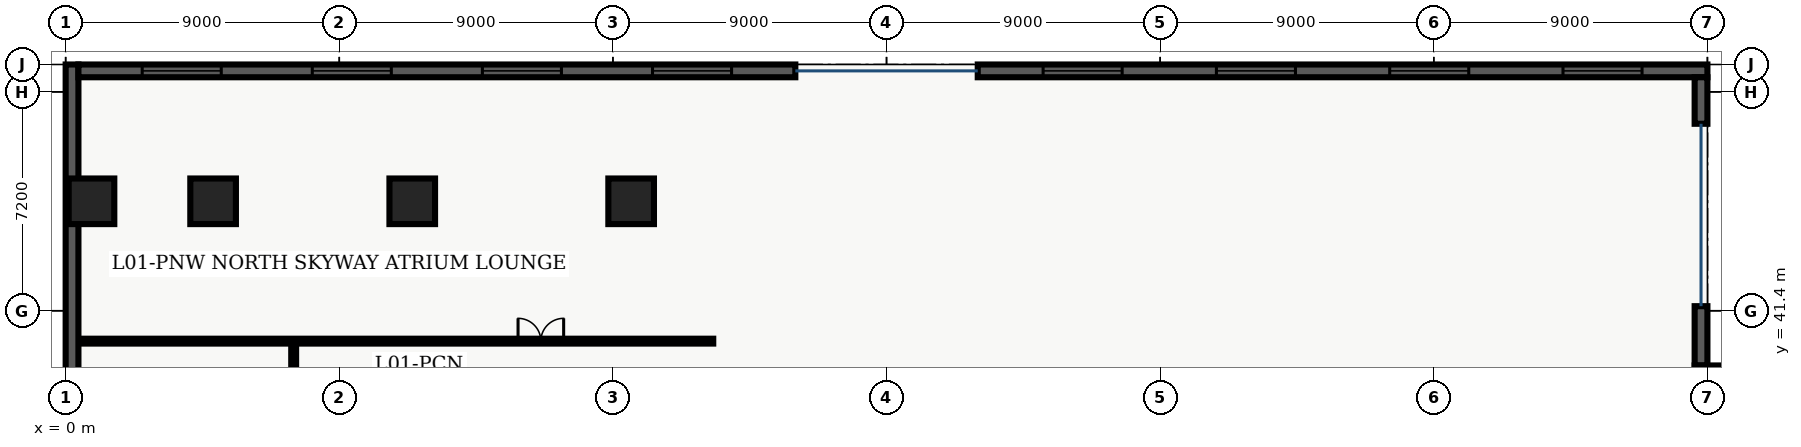
"""IFC4 building model, lengths in metres.
Left out: names, types, materials, properties, quantities, classifications, styles, units other than length and angle.
Written with IfcOpenShell. Run it as: python <this file> out.ifc"""

import sys

from ifc_helpers import new_model, entity, si_unit, converted_unit, direction, frame, origin_with_axes, origin_2d_with_axis, place, context, subcontext, project, spatial, polyline, rectangle, outline, extrude, element, fill, save


model = new_model("IFC4")
c1 = context("Model", 3, precision=1e-05, world=origin_with_axes(), true_north=direction((0.0, 1.0)))
c2 = subcontext(c1, "Body", "Model", "MODEL_VIEW")
j1 = project(units=[si_unit("LENGTHUNIT", "METRE"), converted_unit("PLANEANGLEUNIT", "DEGREE", entity("IfcPlaneAngleMeasure", 0.017), si_unit("PLANEANGLEUNIT", "RADIAN"), dimensions=[0, 0, 0, 0, 0, 0, 0])], contexts=[c1])
p1 = place(None, origin_with_axes())
s1 = spatial("IfcSite", under=j1, at=p1, CompositionType="ELEMENT")
p2 = place(p1, origin_with_axes())
s2 = spatial("IfcBuilding", under=s1, at=p2, CompositionType="ELEMENT")
p3 = place(p2, frame((0.0, 0.0, 5.7), z_axis=(0.0, 0.0, 1.0), x_axis=(1.0, 0.0, 0.0)))
s3 = spatial("IfcBuildingStorey", under=s2, at=p3, CompositionType="ELEMENT", Elevation=5.7)
for number, where, z_axis, x_axis in (
    (1, (11.4, 45.0, 0.0), (0.0, 0.0, 1.0), (1.0, 0.0, 0.0)),
    (2, (18.6, 45.0, 0.0), (0.0, 0.0, 1.0), (1.0, 0.0, 0.0)),
    (3, (4.85, 45.0, 0.0), (0.0, 0.0, 1.0), (1.0, 0.0, 0.0)),
    (4, (0.85, 45.0, 0.0), (0.0, 0.0, 1.0), (1.0, 0.0, 0.0)),
):
    element("IfcColumn", number, at=place(p3, frame(where, z_axis=z_axis, x_axis=x_axis)), inside=s3, PredefinedType="COLUMN", context=c2, shape_type="SweptSolid", body=[
        extrude(rectangle(XDim=1.5, YDim=1.5, at=origin_2d_with_axis()), origin_with_axes(), (0.0, 0.0, 1.0), 5.1),
    ])
p4 = place(p3, frame((0.38, 40.4, 0.0), z_axis=(0.0, 0.0, 1.0), x_axis=(1.0, 0.0, 0.0)))
e5 = element("IfcWall", 5, at=p4, inside=s3, PredefinedType="PARTITIONING", context=c2, shape_type="SweptSolid", body=[
    extrude(outline(polyline([(0.0, -0.08), (20.92, -0.08), (20.92, 0.08), (0.0, 0.08), (0.0, -0.08)])), origin_with_axes(), (0.0, 0.0, 1.0), 3.2),
])
p5 = place(p4, frame((15.25, 0.0, 0.0), z_axis=(0.0, 0.0, 1.0), x_axis=(1.0, 0.0, 0.0)))
e6 = element("IfcOpeningElement", 6, at=p5, cuts=e5, PredefinedType="OPENING", context=c2, shape_type="SweptSolid", body=[
    extrude(rectangle(XDim=1.5, YDim=0.18, at=origin_2d_with_axis()), origin_with_axes(), (0.0, 0.0, 1.0), 2.2),
])
p6 = place(p3, frame((7.5, 7.8, 0.0), z_axis=(0.0, 0.0, 1.0), x_axis=(0.0, 1.0, 0.0)))
e7 = element("IfcWall", 7, at=p6, inside=s3, PredefinedType="PARTITIONING", context=c2, shape_type="SweptSolid", body=[
    extrude(outline(polyline([(0.0, -0.08), (32.6, -0.08), (32.6, 0.08), (0.0, 0.08), (0.0, -0.08)])), origin_with_axes(), (0.0, 0.0, 1.0), 3.2),
])
p7 = place(p6, frame((8.25, 0.0, 0.0), z_axis=(0.0, 0.0, 1.0), x_axis=(1.0, 0.0, 0.0)))
e8 = element("IfcOpeningElement", 8, at=p7, cuts=e7, PredefinedType="OPENING", context=c2, shape_type="SweptSolid", body=[
    extrude(rectangle(XDim=1.5, YDim=0.18, at=origin_2d_with_axis()), origin_with_axes(), (0.0, 0.0, 1.0), 2.2),
])
p8 = place(p6, frame((21.5, 0.0, 0.0), z_axis=(0.0, 0.0, 1.0), x_axis=(1.0, 0.0, 0.0)))
e9 = element("IfcOpeningElement", 9, at=p8, cuts=e7, PredefinedType="OPENING", context=c2, shape_type="SweptSolid", body=[
    extrude(rectangle(XDim=1.0, YDim=0.18, at=origin_2d_with_axis()), origin_with_axes(), (0.0, 0.0, 1.0), 2.15),
])
p9 = place(p3, frame((0.21, 16.6, 0.0), z_axis=(0.0, 0.0, 1.0), x_axis=(0.0, 1.0, 0.0)))
e10 = element("IfcWall", 10, at=p9, inside=s3, PredefinedType="SOLIDWALL", context=c2, shape_type="SweptSolid", body=[
    extrude(outline(polyline([(0.0, -0.21), (32.9, -0.21), (32.9, 0.21), (0.0, 0.21), (0.0, -0.21)])), origin_with_axes(), (0.0, 0.0, 1.0), 4.86),
])
p10 = place(p9, frame((3.692, 0.0, 0.45), z_axis=(0.0, 0.0, 1.0), x_axis=(1.0, 0.0, 0.0)))
e11 = element("IfcOpeningElement", 11, at=p10, cuts=e10, PredefinedType="OPENING", context=c2, shape_type="SweptSolid", body=[
    extrude(rectangle(XDim=2.6, YDim=0.44, at=origin_2d_with_axis()), origin_with_axes(), (0.0, 0.0, 1.0), 2.8),
])
p11 = place(p9, frame((8.525, 0.0, 0.45), z_axis=(0.0, 0.0, 1.0), x_axis=(1.0, 0.0, 0.0)))
e12 = element("IfcOpeningElement", 12, at=p11, cuts=e10, PredefinedType="OPENING", context=c2, shape_type="SweptSolid", body=[
    extrude(rectangle(XDim=2.6, YDim=0.44, at=origin_2d_with_axis()), origin_with_axes(), (0.0, 0.0, 1.0), 2.8),
])
p12 = place(p9, frame((18.642, 0.0, 0.45), z_axis=(0.0, 0.0, 1.0), x_axis=(1.0, 0.0, 0.0)))
e13 = element("IfcOpeningElement", 13, at=p12, cuts=e10, PredefinedType="OPENING", context=c2, shape_type="SweptSolid", body=[
    extrude(rectangle(XDim=2.6, YDim=0.44, at=origin_2d_with_axis()), origin_with_axes(), (0.0, 0.0, 1.0), 2.8),
])
p13 = place(p3, frame((0.42, 49.29, 0.0), z_axis=(0.0, 0.0, 1.0), x_axis=(1.0, 0.0, 0.0)))
e14 = element("IfcWall", 14, at=p13, inside=s3, PredefinedType="SOLIDWALL", context=c2, shape_type="SweptSolid", body=[
    extrude(outline(polyline([(0.0, -0.21), (23.58, -0.21), (23.58, 0.21), (0.0, 0.21), (0.0, -0.21)])), origin_with_axes(), (0.0, 0.0, 1.0), 4.86),
])
p14 = place(p13, frame((3.398, 0.0, 0.45), z_axis=(0.0, 0.0, 1.0), x_axis=(1.0, 0.0, 0.0)))
e15 = element("IfcOpeningElement", 15, at=p14, cuts=e14, PredefinedType="OPENING", context=c2, shape_type="SweptSolid", body=[
    extrude(rectangle(XDim=2.6, YDim=0.44, at=origin_2d_with_axis()), origin_with_axes(), (0.0, 0.0, 1.0), 2.8),
])
p15 = place(p13, frame((8.992, 0.0, 0.45), z_axis=(0.0, 0.0, 1.0), x_axis=(1.0, 0.0, 0.0)))
e16 = element("IfcOpeningElement", 16, at=p15, cuts=e14, PredefinedType="OPENING", context=c2, shape_type="SweptSolid", body=[
    extrude(rectangle(XDim=2.6, YDim=0.44, at=origin_2d_with_axis()), origin_with_axes(), (0.0, 0.0, 1.0), 2.8),
])
p16 = place(p13, frame((14.587, 0.0, 0.45), z_axis=(0.0, 0.0, 1.0), x_axis=(1.0, 0.0, 0.0)))
e17 = element("IfcOpeningElement", 17, at=p16, cuts=e14, PredefinedType="OPENING", context=c2, shape_type="SweptSolid", body=[
    extrude(rectangle(XDim=2.6, YDim=0.44, at=origin_2d_with_axis()), origin_with_axes(), (0.0, 0.0, 1.0), 2.8),
])
p17 = place(p13, frame((20.183, 0.0, 0.45), z_axis=(0.0, 0.0, 1.0), x_axis=(1.0, 0.0, 0.0)))
e18 = element("IfcOpeningElement", 18, at=p17, cuts=e14, PredefinedType="OPENING", context=c2, shape_type="SweptSolid", body=[
    extrude(rectangle(XDim=2.6, YDim=0.44, at=origin_2d_with_axis()), origin_with_axes(), (0.0, 0.0, 1.0), 2.8),
])
p18 = place(p3, frame((30.0, 49.29, 0.0), z_axis=(0.0, 0.0, 1.0), x_axis=(1.0, 0.0, 0.0)))
e19 = element("IfcWall", 19, at=p18, inside=s3, PredefinedType="SOLIDWALL", context=c2, shape_type="SweptSolid", body=[
    extrude(outline(polyline([(0.0, -0.21), (24.0, -0.21), (24.0, 0.21), (0.0, 0.21), (0.0, -0.21)])), origin_with_axes(), (0.0, 0.0, 1.0), 4.86),
])
p19 = place(p18, frame((3.45, 0.0, 0.45), z_axis=(0.0, 0.0, 1.0), x_axis=(1.0, 0.0, 0.0)))
e20 = element("IfcOpeningElement", 20, at=p19, cuts=e19, PredefinedType="OPENING", context=c2, shape_type="SweptSolid", body=[
    extrude(rectangle(XDim=2.6, YDim=0.44, at=origin_2d_with_axis()), origin_with_axes(), (0.0, 0.0, 1.0), 2.8),
])
p20 = place(p18, frame((9.15, 0.0, 0.45), z_axis=(0.0, 0.0, 1.0), x_axis=(1.0, 0.0, 0.0)))
e21 = element("IfcOpeningElement", 21, at=p20, cuts=e19, PredefinedType="OPENING", context=c2, shape_type="SweptSolid", body=[
    extrude(rectangle(XDim=2.6, YDim=0.44, at=origin_2d_with_axis()), origin_with_axes(), (0.0, 0.0, 1.0), 2.8),
])
p21 = place(p18, frame((14.85, 0.0, 0.45), z_axis=(0.0, 0.0, 1.0), x_axis=(1.0, 0.0, 0.0)))
e22 = element("IfcOpeningElement", 22, at=p21, cuts=e19, PredefinedType="OPENING", context=c2, shape_type="SweptSolid", body=[
    extrude(rectangle(XDim=2.6, YDim=0.44, at=origin_2d_with_axis()), origin_with_axes(), (0.0, 0.0, 1.0), 2.8),
])
p22 = place(p18, frame((20.55, 0.0, 0.45), z_axis=(0.0, 0.0, 1.0), x_axis=(1.0, 0.0, 0.0)))
e23 = element("IfcOpeningElement", 23, at=p22, cuts=e19, PredefinedType="OPENING", context=c2, shape_type="SweptSolid", body=[
    extrude(rectangle(XDim=2.6, YDim=0.44, at=origin_2d_with_axis()), origin_with_axes(), (0.0, 0.0, 1.0), 2.8),
])
p23 = place(p3, frame((53.79, 49.08, 0.0), z_axis=(0.0, 0.0, 1.0), x_axis=(0.0, -1.0, 0.0)))
e24 = element("IfcWall", 24, at=p23, inside=s3, PredefinedType="SOLIDWALL", context=c2, shape_type="SweptSolid", body=[
    extrude(outline(polyline([(0.0, -0.21), (1.53, -0.21), (1.53, 0.21), (0.0, 0.21), (0.0, -0.21)])), origin_with_axes(), (0.0, 0.0, 1.0), 4.86),
])
p24 = place(p3, frame((53.79, 41.55, 0.0), z_axis=(0.0, 0.0, 1.0), x_axis=(0.0, -1.0, 0.0)))
e25 = element("IfcWall", 25, at=p24, inside=s3, PredefinedType="SOLIDWALL", context=c2, shape_type="SweptSolid", body=[
    extrude(outline(polyline([(0.0, -0.21), (1.95, -0.21), (1.95, 0.21), (0.0, 0.21), (0.0, -0.21)])), origin_with_axes(), (0.0, 0.0, 1.0), 4.86),
])
p25 = place(p3, frame((53.58, 39.39, 0.0), z_axis=(0.0, 0.0, 1.0), x_axis=(1.0, 0.0, 0.0)))
e26 = element("IfcWall", 26, at=p25, inside=s3, PredefinedType="SOLIDWALL", context=c2, shape_type="SweptSolid", body=[
    extrude(outline(polyline([(0.0, -0.21), (4.62, -0.21), (4.62, 0.21), (0.0, 0.21), (0.0, -0.21)])), origin_with_axes(), (0.0, 0.0, 1.0), 4.86),
])
p26 = place(p25, frame((2.31, 0.0, 0.45), z_axis=(0.0, 0.0, 1.0), x_axis=(1.0, 0.0, 0.0)))
e27 = element("IfcOpeningElement", 27, at=p26, cuts=e26, PredefinedType="OPENING", context=c2, shape_type="SweptSolid", body=[
    extrude(rectangle(XDim=2.6, YDim=0.44, at=origin_2d_with_axis()), origin_with_axes(), (0.0, 0.0, 1.0), 2.8),
])
p27 = place(p4, frame((15.25, 0.0, 0.0), z_axis=(0.0, 0.0, 1.0), x_axis=(1.0, 0.0, 0.0)))
e28 = element("IfcDoor", 28, at=p27, inside=s3, OperationType="DOUBLE_DOOR_SINGLE_SWING", PredefinedType="DOOR", context=c2, shape_type="SweptSolid", body=[
    extrude(rectangle(XDim=1.5, YDim=0.09, at=origin_2d_with_axis()), origin_with_axes(), (0.0, 0.0, 1.0), 2.2),
])
fill(e6, e28)
p28 = place(p13, frame((3.398, 0.0, 0.45), z_axis=(0.0, 0.0, 1.0), x_axis=(1.0, 0.0, 0.0)))
e29 = element("IfcWindow", 29, at=p28, inside=s3, PredefinedType="WINDOW", context=c2, shape_type="SweptSolid", body=[
    extrude(rectangle(XDim=2.6, YDim=0.09, at=origin_2d_with_axis()), origin_with_axes(), (0.0, 0.0, 1.0), 2.8),
])
fill(e15, e29)
p29 = place(p13, frame((8.992, 0.0, 0.45), z_axis=(0.0, 0.0, 1.0), x_axis=(1.0, 0.0, 0.0)))
e30 = element("IfcWindow", 30, at=p29, inside=s3, PredefinedType="WINDOW", context=c2, shape_type="SweptSolid", body=[
    extrude(rectangle(XDim=2.6, YDim=0.09, at=origin_2d_with_axis()), origin_with_axes(), (0.0, 0.0, 1.0), 2.8),
])
fill(e16, e30)
p30 = place(p13, frame((14.587, 0.0, 0.45), z_axis=(0.0, 0.0, 1.0), x_axis=(1.0, 0.0, 0.0)))
e31 = element("IfcWindow", 31, at=p30, inside=s3, PredefinedType="WINDOW", context=c2, shape_type="SweptSolid", body=[
    extrude(rectangle(XDim=2.6, YDim=0.09, at=origin_2d_with_axis()), origin_with_axes(), (0.0, 0.0, 1.0), 2.8),
])
fill(e17, e31)
p31 = place(p13, frame((20.183, 0.0, 0.45), z_axis=(0.0, 0.0, 1.0), x_axis=(1.0, 0.0, 0.0)))
e32 = element("IfcWindow", 32, at=p31, inside=s3, PredefinedType="WINDOW", context=c2, shape_type="SweptSolid", body=[
    extrude(rectangle(XDim=2.6, YDim=0.09, at=origin_2d_with_axis()), origin_with_axes(), (0.0, 0.0, 1.0), 2.8),
])
fill(e18, e32)
p32 = place(p18, frame((3.45, 0.0, 0.45), z_axis=(0.0, 0.0, 1.0), x_axis=(1.0, 0.0, 0.0)))
e33 = element("IfcWindow", 33, at=p32, inside=s3, PredefinedType="WINDOW", context=c2, shape_type="SweptSolid", body=[
    extrude(rectangle(XDim=2.6, YDim=0.09, at=origin_2d_with_axis()), origin_with_axes(), (0.0, 0.0, 1.0), 2.8),
])
fill(e20, e33)
p33 = place(p18, frame((9.15, 0.0, 0.45), z_axis=(0.0, 0.0, 1.0), x_axis=(1.0, 0.0, 0.0)))
e34 = element("IfcWindow", 34, at=p33, inside=s3, PredefinedType="WINDOW", context=c2, shape_type="SweptSolid", body=[
    extrude(rectangle(XDim=2.6, YDim=0.09, at=origin_2d_with_axis()), origin_with_axes(), (0.0, 0.0, 1.0), 2.8),
])
fill(e21, e34)
p34 = place(p18, frame((14.85, 0.0, 0.45), z_axis=(0.0, 0.0, 1.0), x_axis=(1.0, 0.0, 0.0)))
e35 = element("IfcWindow", 35, at=p34, inside=s3, PredefinedType="WINDOW", context=c2, shape_type="SweptSolid", body=[
    extrude(rectangle(XDim=2.6, YDim=0.09, at=origin_2d_with_axis()), origin_with_axes(), (0.0, 0.0, 1.0), 2.8),
])
fill(e22, e35)
p35 = place(p18, frame((20.55, 0.0, 0.45), z_axis=(0.0, 0.0, 1.0), x_axis=(1.0, 0.0, 0.0)))
e36 = element("IfcWindow", 36, at=p35, inside=s3, PredefinedType="WINDOW", context=c2, shape_type="SweptSolid", body=[
    extrude(rectangle(XDim=2.6, YDim=0.09, at=origin_2d_with_axis()), origin_with_axes(), (0.0, 0.0, 1.0), 2.8),
])
fill(e23, e36)
save(model, sys.argv[1])
